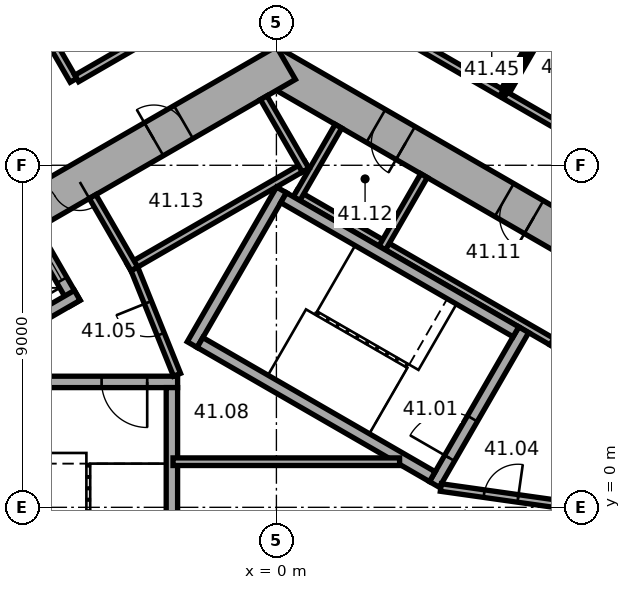
"""IFC4 building model, lengths in metres.
Left out: names, types, materials, properties, quantities, classifications, styles, units other than length and angle.
Written with IfcOpenShell. Run it as: python <this file> out.ifc"""

import sys

from ifc_helpers import new_model, si_unit, direction, frame, frame_2d, origin, place, context, subcontext, project, spatial, rectangle, extrude, element, fill, save


model = new_model("IFC4")
c1 = context("Model", 3, precision=1e-05, world=origin(), true_north=direction((0.0, 1.0)))
c2 = subcontext(c1, "Body", "Model", "MODEL_VIEW")
j1 = project(units=[si_unit("LENGTHUNIT", "METRE"), si_unit("PLANEANGLEUNIT", "RADIAN")], contexts=[c1])
p1 = place(None, origin())
s1 = spatial("IfcSite", under=j1, at=p1, CompositionType="ELEMENT")
p2 = place(p1, origin())
s2 = spatial("IfcBuilding", under=s1, at=p2, CompositionType="ELEMENT")
p3 = place(p2, frame((0.0, 0.0, 168.8)))
s3 = spatial("IfcBuildingStorey", under=s2, at=p3, CompositionType="ELEMENT", Elevation=168.8)
p4 = place(p3, frame((10.25, 5.629, 0.0), z_axis=(0.0, 0.0, 1.0), x_axis=(-0.866022616891, 0.50000482701, 0.0)))
e1 = element("IfcWall", 1, at=p4, inside=s3, PredefinedType="SHEAR", context=c2, shape_type="SweptSolid", body=[
    extrude(rectangle(XDim=12.125, YDim=1.0, at=frame_2d((6.062, 0.0))), origin(), (0.0, 0.0, 1.0), 3.7),
])
p5 = place(p4, frame((4.012, 0.0, 0.0)))
e2 = element("IfcOpeningElement", 2, at=p5, cuts=e1, PredefinedType="OPENING", context=c2, shape_type="SweptSolid", body=[
    extrude(rectangle(XDim=0.9, YDim=2.1, at=frame_2d((0.45, 1.05))), frame((0.0, 0.51, 0.0), z_axis=(0.0, -1.0, 0.0), x_axis=(1.0, 0.0, 0.0)), (0.0, 0.0, 1.0), 1.02),
])
p6 = place(p4, frame((7.912, 0.0, 0.0)))
e3 = element("IfcOpeningElement", 3, at=p6, cuts=e1, PredefinedType="OPENING", context=c2, shape_type="SweptSolid", body=[
    extrude(rectangle(XDim=0.9, YDim=2.1, at=frame_2d((0.45, 1.05))), frame((0.0, 0.51, 0.0), z_axis=(0.0, -1.0, 0.0), x_axis=(1.0, 0.0, 0.0)), (0.0, 0.0, 1.0), 1.02),
])
p7 = place(p3, frame((0.25, 11.691, 0.0), z_axis=(0.0, 0.0, 1.0), x_axis=(-0.866022616891, -0.50000482701, 0.0)))
e4 = element("IfcWall", 4, at=p7, inside=s3, PredefinedType="SHEAR", context=c2, shape_type="SweptSolid", body=[
    extrude(rectangle(XDim=12.125, YDim=1.0, at=frame_2d((6.062, 0.0))), origin(), (0.0, 0.0, 1.0), 3.7),
])
p8 = place(p7, frame((6.262, 0.0, 0.0)))
e5 = element("IfcOpeningElement", 5, at=p8, cuts=e4, PredefinedType="OPENING", context=c2, shape_type="SweptSolid", body=[
    extrude(rectangle(XDim=1.5, YDim=2.1, at=frame_2d((0.75, 1.05))), frame((0.0, 0.51, 0.0), z_axis=(0.0, -1.0, 0.0), x_axis=(1.0, 0.0, 0.0)), (0.0, 0.0, 1.0), 1.02),
])
p9 = place(p7, frame((3.112, 0.0, 0.0)))
e6 = element("IfcOpeningElement", 6, at=p9, cuts=e4, PredefinedType="OPENING", context=c2, shape_type="SweptSolid", body=[
    extrude(rectangle(XDim=0.9, YDim=2.1, at=frame_2d((0.45, 1.05))), frame((0.0, 0.51, 0.0), z_axis=(0.0, -1.0, 0.0), x_axis=(1.0, 0.0, 0.0)), (0.0, 0.0, 1.0), 1.02),
])
p10 = place(p3, frame((7.424, 4.259, 0.0), z_axis=(0.0, 0.0, 1.0), x_axis=(-0.866026010844, 0.49999894854, 0.0)))
e7 = element("IfcWall", 7, at=p10, inside=s3, PredefinedType="PARTITIONING", context=c2, shape_type="SweptSolid", body=[
    extrude(rectangle(XDim=8.0, YDim=0.2, at=frame_2d((4.0, 0.0))), origin(), (0.0, 0.0, 1.0), 3.42),
])
for number, where, z_axis, x_axis in (
    (8, (7.287, 4.222, 0.0), (0.0, 0.0, 1.0), (0.5, 0.866, 0.0)),
    (9, (2.784, 6.822, 0.0), (0.0, 0.0, 1.0), (0.5, 0.866, 0.0)),
    (10, (0.532, 8.122, 0.0), (0.0, 0.0, 1.0), (0.5, 0.866, 0.0)),
):
    element("IfcWall", number, at=place(p3, frame(where, z_axis=z_axis, x_axis=x_axis)), inside=s3, PredefinedType="PARTITIONING", context=c2, shape_type="SweptSolid", body=[
        extrude(rectangle(XDim=2.2, YDim=0.2, at=frame_2d((1.1, 0.0))), origin(), (0.0, 0.0, 1.0), 3.42),
    ])
p11 = place(p3, frame((0.803, 9.009, 0.0), z_axis=(0.0, 0.0, 1.0), x_axis=(-0.866028230842, -0.499995103361, 0.0)))
e11 = element("IfcWall", 11, at=p11, inside=s3, PredefinedType="PARTITIONING", context=c2, shape_type="SweptSolid", body=[
    extrude(rectangle(XDim=5.4, YDim=0.2, at=frame_2d((2.7, 0.0))), origin(), (0.0, 0.0, 1.0), 3.42),
])
p12 = place(p3, frame((0.767, 8.872, 0.0), z_axis=(0.0, 0.0, 1.0), x_axis=(-0.499994660107, 0.866028486751, 0.0)))
e12 = element("IfcWall", 12, at=p12, inside=s3, PredefinedType="PARTITIONING", context=c2, shape_type="SweptSolid", body=[
    extrude(rectangle(XDim=2.2, YDim=0.2, at=frame_2d((1.1, 0.0))), origin(), (0.0, 0.0, 1.0), 3.42),
])
p13 = place(p3, frame((-3.737, 6.272, 0.0), z_axis=(0.0, 0.0, 1.0), x_axis=(-0.50002983664, 0.866008176907, 0.0)))
e13 = element("IfcWall", 13, at=p13, inside=s3, PredefinedType="PARTITIONING", context=c2, shape_type="SweptSolid", body=[
    extrude(rectangle(XDim=2.2, YDim=0.2, at=frame_2d((1.1, 0.0))), origin(), (0.0, 0.0, 1.0), 3.42),
])
p14 = place(p3, frame((4.158, 0.602, 0.0), z_axis=(0.0, 0.0, 1.0), x_axis=(0.499977259774, 0.866038532462, 0.0)))
e14 = element("IfcWall", 14, at=p14, inside=s3, PredefinedType="SHEAR", context=c2, shape_type="SweptSolid", body=[
    extrude(rectangle(XDim=4.7, YDim=0.3, at=frame_2d((2.35, 0.0))), origin(), (0.0, 0.0, 1.0), 3.42),
])
p15 = place(p14, frame((0.8, 0.0, 0.0)))
e15 = element("IfcOpeningElement", 15, at=p15, cuts=e14, PredefinedType="OPENING", context=c2, shape_type="SweptSolid", body=[
    extrude(rectangle(XDim=1.2, YDim=2.1, at=frame_2d((0.6, 1.05))), frame((0.0, 0.16, 0.0), z_axis=(0.0, -1.0, 0.0), x_axis=(1.0, 0.0, 0.0)), (0.0, 0.0, 1.0), 0.32),
])
p16 = place(p3, frame((-2.216, 4.282, 0.0), z_axis=(0.0, 0.0, 1.0), x_axis=(0.499977259774, 0.866038532462, 0.0)))
e16 = element("IfcWall", 16, at=p16, inside=s3, PredefinedType="SHEAR", context=c2, shape_type="SweptSolid", body=[
    extrude(rectangle(XDim=4.7, YDim=0.3, at=frame_2d((2.35, 0.0))), origin(), (0.0, 0.0, 1.0), 3.42),
])
for number, where, z_axis, x_axis in (
    (17, (4.103, 0.807, 0.0), (0.0, 0.0, 1.0), (-0.866, 0.5, 0.0)),
    (18, (6.303, 4.617, 0.0), (0.0, 0.0, 1.0), (-0.866, 0.5, 0.0)),
):
    element("IfcWall", number, at=place(p3, frame(where, z_axis=z_axis, x_axis=x_axis)), inside=s3, PredefinedType="SHEAR", context=c2, shape_type="SweptSolid", body=[
        extrude(rectangle(XDim=7.06, YDim=0.3, at=frame_2d((3.53, 0.0))), origin(), (0.0, 0.0, 1.0), 3.42),
    ])
p17 = place(p3, frame((-2.6, 3.3, 0.0), z_axis=(0.0, 0.0, 1.0), x_axis=(-1.0, 0.0, 0.0)))
e19 = element("IfcWall", 19, at=p17, inside=s3, PredefinedType="SHEAR", context=c2, shape_type="SweptSolid", body=[
    extrude(rectangle(XDim=4.7, YDim=0.3, at=frame_2d((2.35, 0.0))), origin(), (0.0, 0.0, 1.0), 3.42),
])
p18 = place(p17, frame((0.8, 0.0, 0.0)))
e20 = element("IfcOpeningElement", 20, at=p18, cuts=e19, PredefinedType="OPENING", context=c2, shape_type="SweptSolid", body=[
    extrude(rectangle(XDim=1.2, YDim=2.1, at=frame_2d((0.6, 1.05))), frame((0.0, 0.16, 0.0), z_axis=(0.0, -1.0, 0.0), x_axis=(1.0, 0.0, 0.0)), (0.0, 0.0, 1.0), 0.32),
])
p19 = place(p3, frame((-2.75, 3.15, 0.0), z_axis=(0.0, 0.0, 1.0), x_axis=(0.0, -1.0, 0.0)))
e21 = element("IfcWall", 21, at=p19, inside=s3, PredefinedType="SHEAR", context=c2, shape_type="SweptSolid", body=[
    extrude(rectangle(XDim=7.06, YDim=0.3, at=frame_2d((3.53, 0.0))), origin(), (0.0, 0.0, 1.0), 3.42),
])
p20 = place(p3, frame((4.327, 0.521, 0.0), z_axis=(0.0, 0.0, 1.0), x_axis=(0.990124376366, -0.14019172346, 0.0)))
e22 = element("IfcWall", 22, at=p20, inside=s3, PredefinedType="PARTITIONING", context=c2, shape_type="SweptSolid", body=[
    extrude(rectangle(XDim=3.002, YDim=0.2, at=frame_2d((1.501, 0.0))), origin(), (0.0, 0.0, 1.0), 3.42),
])
p21 = place(p20, frame((1.15, 0.0, 0.0)))
e23 = element("IfcOpeningElement", 23, at=p21, cuts=e22, PredefinedType="OPENING", context=c2, shape_type="SweptSolid", body=[
    extrude(rectangle(XDim=0.9, YDim=2.1, at=frame_2d((0.45, 1.05))), frame((0.0, 0.11, 0.0), z_axis=(0.0, -1.0, 0.0), x_axis=(1.0, 0.0, 0.0)), (0.0, 0.0, 1.0), 0.22),
])
p22 = place(p3, frame((-5.295, 5.372, 0.0), z_axis=(0.0, 0.0, 1.0), x_axis=(-0.500077893725, 0.86598042715, 0.0)))
e24 = element("IfcWall", 24, at=p22, inside=s3, PredefinedType="SHEAR", context=c2, shape_type="SweptSolid", body=[
    extrude(rectangle(XDim=2.2, YDim=0.3, at=frame_2d((1.1, 0.0))), origin(), (0.0, 0.0, 1.0), 3.42),
])
p23 = place(p22, frame((0.7, 0.0, 0.0)))
e25 = element("IfcOpeningElement", 25, at=p23, cuts=e24, PredefinedType="OPENING", context=c2, shape_type="SweptSolid", body=[
    extrude(rectangle(XDim=1.1, YDim=2.1, at=frame_2d((0.55, 1.05))), frame((0.0, 0.16, 0.0), z_axis=(0.0, -1.0, 0.0), x_axis=(1.0, 0.0, 0.0)), (0.0, 0.0, 1.0), 0.32),
])
p24 = place(p3, frame((-5.24, 5.577, 0.0), z_axis=(0.0, 0.0, 1.0), x_axis=(-0.866014461049, -0.500018952895, 0.0)))
e26 = element("IfcWall", 26, at=p24, inside=s3, PredefinedType="SHEAR", context=c2, shape_type="SweptSolid", body=[
    extrude(rectangle(XDim=3.35, YDim=0.3, at=frame_2d((1.675, 0.0))), origin(), (0.0, 0.0, 1.0), 3.42),
])
p25 = place(p3, frame((-2.615, 3.487, 0.0), z_axis=(0.0, 0.0, 1.0), x_axis=(-0.373576831041, 0.92759924068, 0.0)))
e27 = element("IfcWall", 27, at=p25, inside=s3, PredefinedType="PARTITIONING", context=c2, shape_type="SweptSolid", body=[
    extrude(rectangle(XDim=3.002, YDim=0.2, at=frame_2d((1.501, 0.0))), origin(), (0.0, 0.0, 1.0), 3.42),
])
p26 = place(p25, frame((1.15, 0.0, 0.0)))
e28 = element("IfcOpeningElement", 28, at=p26, cuts=e27, PredefinedType="OPENING", context=c2, shape_type="SweptSolid", body=[
    extrude(rectangle(XDim=0.9, YDim=2.1, at=frame_2d((0.45, 1.05))), frame((0.0, 0.11, 0.0), z_axis=(0.0, -1.0, 0.0), x_axis=(1.0, 0.0, 0.0)), (0.0, 0.0, 1.0), 0.22),
])
p27 = place(p3, frame((-2.72, 1.2, 0.0), z_axis=(0.0, 0.0, 1.0), x_axis=(1.0, 0.0, 0.0)))
e29 = element("IfcWall", 29, at=p27, inside=s3, PredefinedType="PARTITIONING", context=c2, shape_type="SweptSolid", body=[
    extrude(rectangle(XDim=5.961, YDim=0.2, at=frame_2d((2.981, 0.0))), origin(), (0.0, 0.0, 1.0), 3.42),
])
p28 = place(p3, frame((-9.515, 18.466, 0.0), z_axis=(0.0, 0.0, 1.0), x_axis=(0.500010139422, -0.866019549707, 0.0)))
e30 = element("IfcWall", 30, at=p28, inside=s3, PredefinedType="PARTITIONING", context=c2, shape_type="SweptSolid", body=[
    extrude(rectangle(XDim=8.35, YDim=0.2, at=frame_2d((4.175, 0.0))), origin(), (0.0, 0.0, 1.0), 2.87),
])
p29 = place(p28, frame((3.675, 0.0, 0.0)))
e31 = element("IfcOpeningElement", 31, at=p29, cuts=e30, PredefinedType="OPENING", context=c2, shape_type="SweptSolid", body=[
    extrude(rectangle(XDim=1.0, YDim=2.1, at=frame_2d((0.5, 1.05))), frame((0.0, 0.11, 0.0), z_axis=(0.0, -1.0, 0.0), x_axis=(1.0, 0.0, 0.0)), (0.0, 0.0, 1.0), 0.22),
])
p30 = place(p3, frame((-0.95, 13.77, 0.0), z_axis=(0.0, 0.0, 1.0), x_axis=(-0.866036689987, -0.499980451214, 0.0)))
e32 = element("IfcWall", 32, at=p30, inside=s3, PredefinedType="PARTITIONING", context=c2, shape_type="SweptSolid", body=[
    extrude(rectangle(XDim=4.969, YDim=0.2, at=frame_2d((2.485, 0.0))), origin(), (0.0, 0.0, 1.0), 3.42),
])
p31 = place(p3, frame((4.24, 11.986, 0.0), z_axis=(0.0, 0.0, 1.0), x_axis=(0.499952165731, 0.866053019151, 0.0)))
e33 = element("IfcWall", 33, at=p31, inside=s3, PredefinedType="PARTITIONING", context=c2, shape_type="SweptSolid", body=[
    extrude(rectangle(XDim=2.3, YDim=0.12, at=frame_2d((1.15, 0.0))), origin(), (0.0, 0.0, 1.0), 3.42),
])
p32 = place(p31, frame((0.7, 0.0, 0.0)))
e34 = element("IfcOpeningElement", 34, at=p32, cuts=e33, PredefinedType="OPENING", context=c2, shape_type="SweptSolid", body=[
    extrude(rectangle(XDim=0.9, YDim=2.1, at=frame_2d((0.45, 1.05))), frame((0.0, 0.07, 0.0), z_axis=(0.0, -1.0, 0.0), x_axis=(1.0, 0.0, 0.0)), (0.0, 0.0, 1.0), 0.14),
])
p33 = place(p3, frame((5.922, 10.899, 0.0), z_axis=(0.0, 0.0, 1.0), x_axis=(-0.866031556924, 0.499989342298, 0.0)))
e35 = element("IfcWall", 35, at=p33, inside=s3, PredefinedType="PARTITIONING", context=c2, shape_type="SweptSolid", body=[
    extrude(rectangle(XDim=5.701, YDim=0.2, at=frame_2d((2.851, 0.0))), origin(), (0.0, 0.0, 1.0), 3.42),
])
p34 = place(p3, frame((6.076, 10.926, 0.0), z_axis=(0.0, 0.0, 1.0), x_axis=(0.500010275428, 0.866019471182, 0.0)))
e36 = element("IfcWall", 36, at=p34, inside=s3, PredefinedType="PARTITIONING", context=c2, shape_type="SweptSolid", body=[
    extrude(rectangle(XDim=3.5, YDim=0.12, at=frame_2d((1.75, 0.0))), origin(), (0.0, 0.0, 1.0), 3.42),
])
p35 = place(p3, frame((7.092, 12.926, 0.0), z_axis=(0.0, 0.0, 1.0), x_axis=(-0.500030632641, -0.866007717299, 0.0)))
e37 = element("IfcWall", 37, at=p35, inside=s3, PredefinedType="PARTITIONING", context=c2, shape_type="SweptSolid", body=[
    extrude(rectangle(XDim=2.24, YDim=0.12, at=frame_2d((1.12, 0.0))), origin(), (0.0, 0.0, 1.0), 3.42),
])
p36 = place(p3, frame((8.971, 9.139, 0.0), z_axis=(0.0, 0.0, 1.0), x_axis=(-0.866038511948, 0.499977295307, 0.0)))
e38 = element("IfcWall", 38, at=p36, inside=s3, PredefinedType="PARTITIONING", context=c2, shape_type="SweptSolid", body=[
    extrude(rectangle(XDim=3.4, YDim=0.2, at=frame_2d((1.7, 0.0))), origin(), (0.0, 0.0, 1.0), 3.42),
])
p37 = place(p8, origin())
e39 = element("IfcDoor", 39, at=p37, inside=s3, OperationType="DOUBLE_DOOR_SINGLE_SWING", PredefinedType="DOOR", context=c2, shape_type="SweptSolid", body=[
    extrude(rectangle(XDim=1.5, YDim=2.1, at=frame_2d((0.75, 1.05))), frame((0.0, 0.025, 0.0), z_axis=(0.0, -1.0, 0.0), x_axis=(1.0, 0.0, 0.0)), (0.0, 0.0, 1.0), 0.05),
])
fill(e5, e39)
p38 = place(p15, origin())
e40 = element("IfcDoor", 40, at=p38, inside=s3, OperationType="SINGLE_SWING_RIGHT", PredefinedType="DOOR", context=c2, shape_type="SweptSolid", body=[
    extrude(rectangle(XDim=1.2, YDim=2.1, at=frame_2d((0.6, 1.05))), frame((0.0, 0.025, 0.0), z_axis=(0.0, -1.0, 0.0), x_axis=(1.0, 0.0, 0.0)), (0.0, 0.0, 1.0), 0.05),
])
fill(e15, e40)
p39 = place(p18, origin())
e41 = element("IfcDoor", 41, at=p39, inside=s3, OperationType="SINGLE_SWING_RIGHT", PredefinedType="DOOR", context=c2, shape_type="SweptSolid", body=[
    extrude(rectangle(XDim=1.2, YDim=2.1, at=frame_2d((0.6, 1.05))), frame((0.0, 0.025, 0.0), z_axis=(0.0, -1.0, 0.0), x_axis=(1.0, 0.0, 0.0)), (0.0, 0.0, 1.0), 0.05),
])
fill(e20, e41)
p40 = place(p21, origin())
e42 = element("IfcDoor", 42, at=p40, inside=s3, OperationType="SINGLE_SWING_LEFT", PredefinedType="DOOR", context=c2, shape_type="SweptSolid", body=[
    extrude(rectangle(XDim=0.9, YDim=2.1, at=frame_2d((0.45, 1.05))), frame((0.0, 0.025, 0.0), z_axis=(0.0, -1.0, 0.0), x_axis=(1.0, 0.0, 0.0)), (0.0, 0.0, 1.0), 0.05),
])
fill(e23, e42)
p41 = place(p26, origin())
e43 = element("IfcDoor", 43, at=p41, inside=s3, OperationType="SINGLE_SWING_LEFT", PredefinedType="DOOR", context=c2, shape_type="SweptSolid", body=[
    extrude(rectangle(XDim=0.9, YDim=2.1, at=frame_2d((0.45, 1.05))), frame((0.0, 0.025, 0.0), z_axis=(0.0, -1.0, 0.0), x_axis=(1.0, 0.0, 0.0)), (0.0, 0.0, 1.0), 0.05),
])
fill(e28, e43)
p42 = place(p5, origin())
e44 = element("IfcDoor", 44, at=p42, inside=s3, OperationType="SINGLE_SWING_LEFT", PredefinedType="DOOR", context=c2, shape_type="SweptSolid", body=[
    extrude(rectangle(XDim=0.9, YDim=2.1, at=frame_2d((0.45, 1.05))), frame((0.0, 0.025, 0.0), z_axis=(0.0, -1.0, 0.0), x_axis=(1.0, 0.0, 0.0)), (0.0, 0.0, 1.0), 0.05),
])
fill(e2, e44)
p43 = place(p6, origin())
e45 = element("IfcDoor", 45, at=p43, inside=s3, OperationType="SINGLE_SWING_LEFT", PredefinedType="DOOR", context=c2, shape_type="SweptSolid", body=[
    extrude(rectangle(XDim=0.9, YDim=2.1, at=frame_2d((0.45, 1.05))), frame((0.0, 0.025, 0.0), z_axis=(0.0, -1.0, 0.0), x_axis=(1.0, 0.0, 0.0)), (0.0, 0.0, 1.0), 0.05),
])
fill(e3, e45)
p44 = place(p9, origin())
e46 = element("IfcDoor", 46, at=p44, inside=s3, OperationType="SINGLE_SWING_LEFT", PredefinedType="DOOR", context=c2, shape_type="SweptSolid", body=[
    extrude(rectangle(XDim=0.9, YDim=2.1, at=frame_2d((0.45, 1.05))), frame((0.0, 0.025, 0.0), z_axis=(0.0, -1.0, 0.0), x_axis=(1.0, 0.0, 0.0)), (0.0, 0.0, 1.0), 0.05),
])
fill(e6, e46)
p45 = place(p23, origin())
e47 = element("IfcDoor", 47, at=p45, inside=s3, OperationType="DOUBLE_DOOR_SLIDING", PredefinedType="DOOR", context=c2, shape_type="SweptSolid", body=[
    extrude(rectangle(XDim=1.1, YDim=2.1, at=frame_2d((0.55, 1.05))), frame((0.0, 0.025, 0.0), z_axis=(0.0, -1.0, 0.0), x_axis=(1.0, 0.0, 0.0)), (0.0, 0.0, 1.0), 0.05),
])
fill(e25, e47)
save(model, sys.argv[1])
